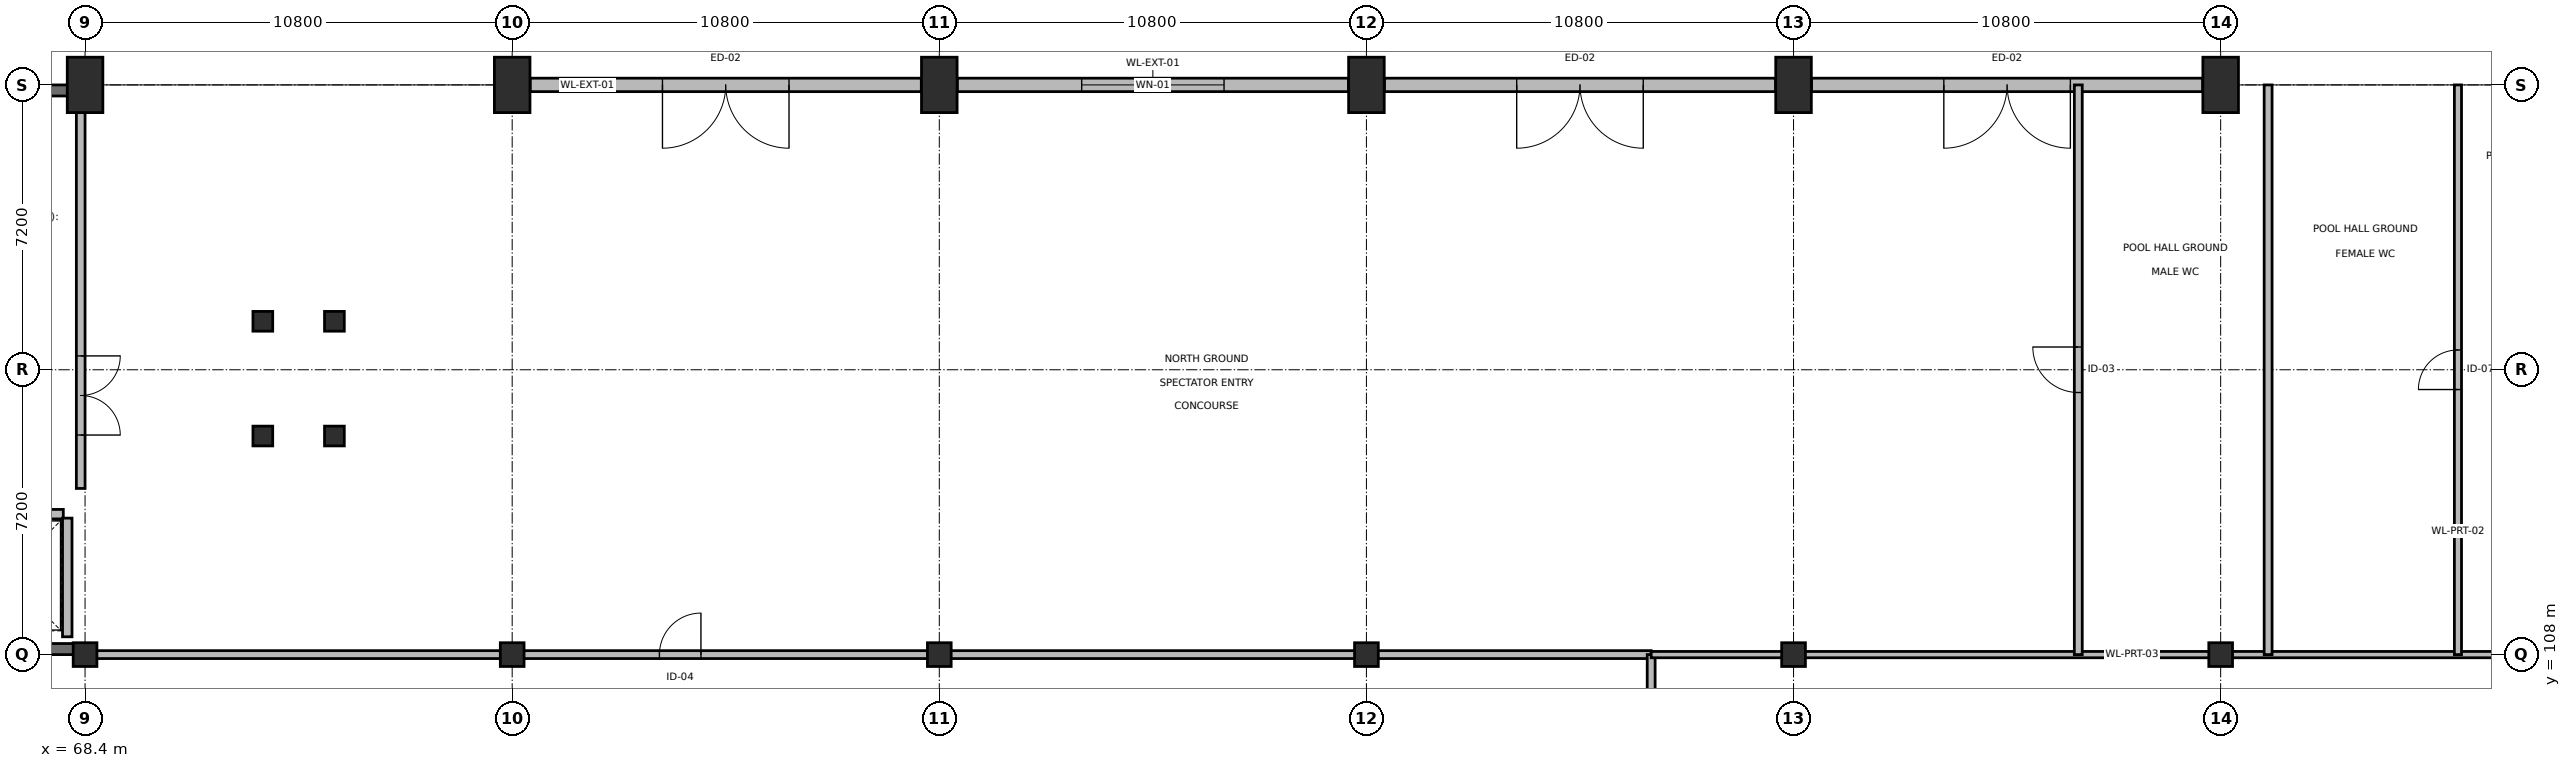
"""IFC4 building model, lengths in metres.
Left out: names, types, materials, properties, quantities, classifications, styles, units other than length and angle.
Written with IfcOpenShell. Run it as: python <this file> out.ifc"""

import sys

from ifc_helpers import new_model, si_unit, direction, frame, frame_2d, origin, origin_2d, place, context, subcontext, project, spatial, rectangle, extrude, element, fill, save


model = new_model("IFC4")
c1 = context("Model", 3, precision=1e-05, world=origin(), true_north=direction((0.0, 1.0)))
c2 = subcontext(c1, "Body", "Model", "MODEL_VIEW")
j1 = project(units=[si_unit("LENGTHUNIT", "METRE"), si_unit("PLANEANGLEUNIT", "RADIAN")], contexts=[c1])
p1 = place(None, origin())
s1 = spatial("IfcSite", under=j1, at=p1, CompositionType="ELEMENT")
p2 = place(p1, origin())
s2 = spatial("IfcBuilding", under=s1, at=p2, CompositionType="ELEMENT")
p3 = place(p2, origin())
s3 = spatial("IfcBuildingStorey", under=s2, at=p3, CompositionType="ELEMENT", Elevation=0.0)
for number, where, z_axis, x_axis in (
    (1, (68.4, 122.4, 0.0), (0.0, 0.0, 1.0), (1.0, 0.0, 0.0)),
    (2, (111.6, 122.4, 0.0), (0.0, 0.0, 1.0), (1.0, 0.0, 0.0)),
    (3, (79.2, 122.4, 0.0), (0.0, 0.0, 1.0), (1.0, 0.0, 0.0)),
    (4, (90.0, 122.4, 0.0), (0.0, 0.0, 1.0), (1.0, 0.0, 0.0)),
    (5, (100.8, 122.4, 0.0), (0.0, 0.0, 1.0), (1.0, 0.0, 0.0)),
    (6, (122.4, 122.4, 0.0), (0.0, 0.0, 1.0), (1.0, 0.0, 0.0)),
):
    element("IfcColumn", number, at=place(p3, frame(where, z_axis=z_axis, x_axis=x_axis)), inside=s3, PredefinedType="COLUMN", context=c2, shape_type="SweptSolid", body=[
        extrude(rectangle(XDim=0.9, YDim=1.4, at=origin_2d()), origin(), (0.0, 0.0, 1.0), 4.8),
    ])
for number, where, z_axis, x_axis in (
    (7, (68.4, 108.0, 0.0), (0.0, 0.0, 1.0), (1.0, 0.0, 0.0)),
    (8, (79.2, 108.0, 0.0), (0.0, 0.0, 1.0), (1.0, 0.0, 0.0)),
    (9, (90.0, 108.0, 0.0), (0.0, 0.0, 1.0), (1.0, 0.0, 0.0)),
    (10, (100.8, 108.0, 0.0), (0.0, 0.0, 1.0), (1.0, 0.0, 0.0)),
    (11, (111.6, 108.0, 0.0), (0.0, 0.0, 1.0), (1.0, 0.0, 0.0)),
    (12, (122.4, 108.0, 0.0), (0.0, 0.0, 1.0), (1.0, 0.0, 0.0)),
):
    element("IfcColumn", number, at=place(p3, frame(where, z_axis=z_axis, x_axis=x_axis)), inside=s3, PredefinedType="COLUMN", context=c2, shape_type="SweptSolid", body=[
        extrude(rectangle(XDim=0.6, YDim=0.6, at=origin_2d()), origin(), (0.0, 0.0, 1.0), 4.8),
    ])
for number, where, z_axis, x_axis in (
    (13, (72.895, 113.525, 0.0), (0.0, 0.0, 1.0), (1.0, 0.0, 0.0)),
    (14, (72.895, 116.425, 0.0), (0.0, 0.0, 1.0), (1.0, 0.0, 0.0)),
    (15, (74.705, 113.525, 0.0), (0.0, 0.0, 1.0), (1.0, 0.0, 0.0)),
    (16, (74.705, 116.425, 0.0), (0.0, 0.0, 1.0), (1.0, 0.0, 0.0)),
):
    element("IfcColumn", number, at=place(p3, frame(where, z_axis=z_axis, x_axis=x_axis)), inside=s3, PredefinedType="COLUMN", context=c2, shape_type="SweptSolid", body=[
        extrude(rectangle(XDim=0.5, YDim=0.5, at=origin_2d()), origin(), (0.0, 0.0, 1.0), 4.8),
    ])
p4 = place(p3, frame((57.6, 108.14, 0.0), z_axis=(0.0, 0.0, 1.0), x_axis=(1.0, 0.0, 0.0)))
e17 = element("IfcWall", 17, at=p4, inside=s3, PredefinedType="SHEAR", context=c2, shape_type="SweptSolid", body=[
    extrude(rectangle(XDim=10.8, YDim=0.28, at=frame_2d((5.4, 0.0))), origin(), (0.0, 0.0, 1.0), 4.8),
])
p5 = place(p3, frame((64.0, 122.26, 0.0), z_axis=(0.0, 0.0, 1.0), x_axis=(1.0, 0.0, 0.0)))
e18 = element("IfcWall", 18, at=p5, inside=s3, PredefinedType="SHEAR", context=c2, shape_type="SweptSolid", body=[
    extrude(rectangle(XDim=4.4, YDim=0.28, at=frame_2d((2.2, 0.0))), origin(), (0.0, 0.0, 1.0), 4.8),
])
p6 = place(p3, frame((79.655, 122.4, 0.0), z_axis=(0.0, 0.0, 1.0), x_axis=(1.0, 0.0, 0.0)))
e19 = element("IfcWall", 19, at=p6, inside=s3, PredefinedType="SOLIDWALL", context=c2, shape_type="SweptSolid", body=[
    extrude(rectangle(XDim=9.89, YDim=0.34, at=frame_2d((4.945, 0.0))), origin(), (0.0, 0.0, 1.0), 3.655),
])
p7 = place(p6, frame((3.345, 0.0, 0.0)))
e20 = element("IfcOpeningElement", 20, at=p7, cuts=e19, PredefinedType="OPENING", context=c2, shape_type="SweptSolid", body=[
    extrude(rectangle(XDim=3.2, YDim=2.6, at=frame_2d((1.6, 1.3))), frame((0.0, 0.18, 0.0), z_axis=(0.0, -1.0, 0.0), x_axis=(1.0, 0.0, 0.0)), (0.0, 0.0, 1.0), 0.36),
])
p8 = place(p3, frame((90.455, 122.4, 0.0), z_axis=(0.0, 0.0, 1.0), x_axis=(1.0, 0.0, 0.0)))
e21 = element("IfcWall", 21, at=p8, inside=s3, PredefinedType="SOLIDWALL", context=c2, shape_type="SweptSolid", body=[
    extrude(rectangle(XDim=9.89, YDim=0.34, at=frame_2d((4.945, 0.0))), origin(), (0.0, 0.0, 1.0), 3.655),
])
p9 = place(p8, frame((3.145, 0.0, 0.95)))
e22 = element("IfcOpeningElement", 22, at=p9, cuts=e21, PredefinedType="OPENING", context=c2, shape_type="SweptSolid", body=[
    extrude(rectangle(XDim=3.6, YDim=0.9, at=frame_2d((1.8, 0.45))), frame((0.0, 0.18, 0.0), z_axis=(0.0, -1.0, 0.0), x_axis=(1.0, 0.0, 0.0)), (0.0, 0.0, 1.0), 0.36),
])
p10 = place(p3, frame((101.255, 122.4, 0.0), z_axis=(0.0, 0.0, 1.0), x_axis=(1.0, 0.0, 0.0)))
e23 = element("IfcWall", 23, at=p10, inside=s3, PredefinedType="SOLIDWALL", context=c2, shape_type="SweptSolid", body=[
    extrude(rectangle(XDim=9.89, YDim=0.34, at=frame_2d((4.945, 0.0))), origin(), (0.0, 0.0, 1.0), 3.655),
])
p11 = place(p10, frame((3.345, 0.0, 0.0)))
e24 = element("IfcOpeningElement", 24, at=p11, cuts=e23, PredefinedType="OPENING", context=c2, shape_type="SweptSolid", body=[
    extrude(rectangle(XDim=3.2, YDim=2.6, at=frame_2d((1.6, 1.3))), frame((0.0, 0.18, 0.0), z_axis=(0.0, -1.0, 0.0), x_axis=(1.0, 0.0, 0.0)), (0.0, 0.0, 1.0), 0.36),
])
p12 = place(p3, frame((112.055, 122.4, 0.0), z_axis=(0.0, 0.0, 1.0), x_axis=(1.0, 0.0, 0.0)))
e25 = element("IfcWall", 25, at=p12, inside=s3, PredefinedType="SOLIDWALL", context=c2, shape_type="SweptSolid", body=[
    extrude(rectangle(XDim=9.89, YDim=0.34, at=frame_2d((4.945, 0.0))), origin(), (0.0, 0.0, 1.0), 3.655),
])
p13 = place(p12, frame((3.345, 0.0, 0.0)))
e26 = element("IfcOpeningElement", 26, at=p13, cuts=e25, PredefinedType="OPENING", context=c2, shape_type="SweptSolid", body=[
    extrude(rectangle(XDim=3.2, YDim=2.6, at=frame_2d((1.6, 1.3))), frame((0.0, 0.18, 0.0), z_axis=(0.0, -1.0, 0.0), x_axis=(1.0, 0.0, 0.0)), (0.0, 0.0, 1.0), 0.36),
])
p14 = place(p3, frame((64.95, 111.55, 0.0), z_axis=(0.0, 0.0, 1.0), x_axis=(1.0, 0.0, 0.0)))
e27 = element("IfcWall", 27, at=p14, inside=s3, PredefinedType="SOLIDWALL", context=c2, shape_type="SweptSolid", body=[
    extrude(rectangle(XDim=2.9, YDim=0.24, at=frame_2d((1.45, 0.0))), origin(), (0.0, 0.0, 1.0), 4.505),
])
p15 = place(p14, frame((0.9, 0.0, 0.0)))
e28 = element("IfcOpeningElement", 28, at=p15, cuts=e27, PredefinedType="OPENING", context=c2, shape_type="SweptSolid", body=[
    extrude(rectangle(XDim=1.1, YDim=2.15, at=frame_2d((0.55, 1.075))), frame((0.0, 0.13, 0.0), z_axis=(0.0, -1.0, 0.0), x_axis=(1.0, 0.0, 0.0)), (0.0, 0.0, 1.0), 0.26),
])
p16 = place(p3, frame((67.95, 108.45, 0.0), z_axis=(0.0, 0.0, 1.0), x_axis=(0.0, 1.0, 0.0)))
e29 = element("IfcWall", 29, at=p16, inside=s3, PredefinedType="SOLIDWALL", context=c2, shape_type="SweptSolid", body=[
    extrude(rectangle(XDim=3.0, YDim=0.24, at=frame_2d((1.5, 0.0))), origin(), (0.0, 0.0, 1.0), 4.505),
])
p17 = place(p3, frame((68.29, 112.2, 0.0), z_axis=(0.0, 0.0, 1.0), x_axis=(0.0, 1.0, 0.0)))
e30 = element("IfcWall", 30, at=p17, inside=s3, PredefinedType="PARTITIONING", context=c2, shape_type="SweptSolid", body=[
    extrude(rectangle(XDim=9.75, YDim=0.22, at=frame_2d((4.875, 0.0))), origin(), (0.0, 0.0, 1.0), 3.755),
])
p18 = place(p17, frame((1.35, 0.0, 0.0)))
e31 = element("IfcOpeningElement", 31, at=p18, cuts=e30, PredefinedType="OPENING", context=c2, shape_type="SweptSolid", body=[
    extrude(rectangle(XDim=2.0, YDim=2.2, at=frame_2d((1.0, 1.1))), frame((0.0, 0.12, 0.0), z_axis=(0.0, -1.0, 0.0), x_axis=(1.0, 0.0, 0.0)), (0.0, 0.0, 1.0), 0.24),
])
p19 = place(p3, frame((68.4, 108.0, 0.0), z_axis=(0.0, 0.0, 1.0), x_axis=(1.0, 0.0, 0.0)))
e32 = element("IfcWall", 32, at=p19, inside=s3, PredefinedType="PARTITIONING", context=c2, shape_type="SweptSolid", body=[
    extrude(rectangle(XDim=39.6, YDim=0.2, at=frame_2d((19.8, 0.0))), origin(), (0.0, 0.0, 1.0), 2.905),
])
p20 = place(p19, frame((14.523, 0.0, 0.0)))
e33 = element("IfcOpeningElement", 33, at=p20, cuts=e32, PredefinedType="OPENING", context=c2, shape_type="SweptSolid", body=[
    extrude(rectangle(XDim=1.05, YDim=2.15, at=frame_2d((0.525, 1.075))), frame((0.0, 0.11, 0.0), z_axis=(0.0, -1.0, 0.0), x_axis=(1.0, 0.0, 0.0)), (0.0, 0.0, 1.0), 0.22),
])
p21 = place(p3, frame((108.0, 86.4, 0.0), z_axis=(0.0, 0.0, 1.0), x_axis=(0.0, 1.0, 0.0)))
e34 = element("IfcWall", 34, at=p21, inside=s3, PredefinedType="PARTITIONING", context=c2, shape_type="SweptSolid", body=[
    extrude(rectangle(XDim=21.6, YDim=0.2, at=frame_2d((10.8, 0.0))), origin(), (0.0, 0.0, 1.0), 2.905),
])
p22 = place(p3, frame((108.0, 108.0, 0.0), z_axis=(0.0, 0.0, 1.0), x_axis=(1.0, 0.0, 0.0)))
e35 = element("IfcWall", 35, at=p22, inside=s3, PredefinedType="PARTITIONING", context=c2, shape_type="SweptSolid", body=[
    extrude(rectangle(XDim=25.2, YDim=0.16, at=frame_2d((12.6, 0.0))), origin(), (0.0, 0.0, 1.0), 2.905),
])
p23 = place(p3, frame((118.8, 108.0, 0.0), z_axis=(0.0, 0.0, 1.0), x_axis=(0.0, 1.0, 0.0)))
e36 = element("IfcWall", 36, at=p23, inside=s3, PredefinedType="PARTITIONING", context=c2, shape_type="SweptSolid", body=[
    extrude(rectangle(XDim=14.4, YDim=0.2, at=frame_2d((7.2, 0.0))), origin(), (0.0, 0.0, 1.0), 3.655),
])
p24 = place(p23, frame((6.625, 0.0, 0.0)))
e37 = element("IfcOpeningElement", 37, at=p24, cuts=e36, PredefinedType="OPENING", context=c2, shape_type="SweptSolid", body=[
    extrude(rectangle(XDim=1.15, YDim=2.2, at=frame_2d((0.575, 1.1))), frame((0.0, 0.11, 0.0), z_axis=(0.0, -1.0, 0.0), x_axis=(1.0, 0.0, 0.0)), (0.0, 0.0, 1.0), 0.22),
])
p25 = place(p3, frame((123.6, 108.0, 0.0), z_axis=(0.0, 0.0, 1.0), x_axis=(0.0, 1.0, 0.0)))
e38 = element("IfcWall", 38, at=p25, inside=s3, PredefinedType="PARTITIONING", context=c2, shape_type="SweptSolid", body=[
    extrude(rectangle(XDim=14.4, YDim=0.2, at=frame_2d((7.2, 0.0))), origin(), (0.0, 0.0, 1.0), 3.655),
])
p26 = place(p3, frame((128.4, 108.0, 0.0), z_axis=(0.0, 0.0, 1.0), x_axis=(0.0, 1.0, 0.0)))
e39 = element("IfcWall", 39, at=p26, inside=s3, PredefinedType="PARTITIONING", context=c2, shape_type="SweptSolid", body=[
    extrude(rectangle(XDim=14.4, YDim=0.18, at=frame_2d((7.2, 0.0))), origin(), (0.0, 0.0, 1.0), 3.655),
])
p27 = place(p26, frame((6.7, 0.0, 0.0)))
e40 = element("IfcOpeningElement", 40, at=p27, cuts=e39, PredefinedType="OPENING", context=c2, shape_type="SweptSolid", body=[
    extrude(rectangle(XDim=1.0, YDim=2.1, at=frame_2d((0.5, 1.05))), frame((0.0, 0.1, 0.0), z_axis=(0.0, -1.0, 0.0), x_axis=(1.0, 0.0, 0.0)), (0.0, 0.0, 1.0), 0.2),
])
p28 = place(p7, origin())
e41 = element("IfcDoor", 41, at=p28, inside=s3, OperationType="DOUBLE_DOOR_SINGLE_SWING", PredefinedType="DOOR", context=c2, shape_type="SweptSolid", body=[
    extrude(rectangle(XDim=3.2, YDim=2.6, at=frame_2d((1.6, 1.3))), frame((0.0, 0.025, 0.0), z_axis=(0.0, -1.0, 0.0), x_axis=(1.0, 0.0, 0.0)), (0.0, 0.0, 1.0), 0.05),
])
fill(e20, e41)
p29 = place(p9, origin())
e42 = element("IfcWindow", 42, at=p29, inside=s3, PartitioningType="SINGLE_PANEL", PredefinedType="WINDOW", context=c2, shape_type="SweptSolid", body=[
    extrude(rectangle(XDim=3.6, YDim=0.9, at=frame_2d((1.8, 0.45))), frame((0.0, 0.03, 0.0), z_axis=(0.0, -1.0, 0.0), x_axis=(1.0, 0.0, 0.0)), (0.0, 0.0, 1.0), 0.06),
])
fill(e22, e42)
p30 = place(p11, origin())
e43 = element("IfcDoor", 43, at=p30, inside=s3, OperationType="DOUBLE_DOOR_SINGLE_SWING", PredefinedType="DOOR", context=c2, shape_type="SweptSolid", body=[
    extrude(rectangle(XDim=3.2, YDim=2.6, at=frame_2d((1.6, 1.3))), frame((0.0, 0.025, 0.0), z_axis=(0.0, -1.0, 0.0), x_axis=(1.0, 0.0, 0.0)), (0.0, 0.0, 1.0), 0.05),
])
fill(e24, e43)
p31 = place(p13, origin())
e44 = element("IfcDoor", 44, at=p31, inside=s3, OperationType="DOUBLE_DOOR_SINGLE_SWING", PredefinedType="DOOR", context=c2, shape_type="SweptSolid", body=[
    extrude(rectangle(XDim=3.2, YDim=2.6, at=frame_2d((1.6, 1.3))), frame((0.0, 0.025, 0.0), z_axis=(0.0, -1.0, 0.0), x_axis=(1.0, 0.0, 0.0)), (0.0, 0.0, 1.0), 0.05),
])
fill(e26, e44)
p32 = place(p18, origin())
e45 = element("IfcDoor", 45, at=p32, inside=s3, OperationType="DOUBLE_DOOR_SINGLE_SWING", PredefinedType="DOOR", context=c2, shape_type="SweptSolid", body=[
    extrude(rectangle(XDim=2.0, YDim=2.2, at=frame_2d((1.0, 1.1))), frame((0.0, 0.025, 0.0), z_axis=(0.0, -1.0, 0.0), x_axis=(1.0, 0.0, 0.0)), (0.0, 0.0, 1.0), 0.05),
])
fill(e31, e45)
p33 = place(p20, origin())
e46 = element("IfcDoor", 46, at=p33, inside=s3, OperationType="SINGLE_SWING_RIGHT", PredefinedType="DOOR", context=c2, shape_type="SweptSolid", body=[
    extrude(rectangle(XDim=1.05, YDim=2.15, at=frame_2d((0.525, 1.075))), frame((0.0, 0.025, 0.0), z_axis=(0.0, -1.0, 0.0), x_axis=(1.0, 0.0, 0.0)), (0.0, 0.0, 1.0), 0.05),
])
fill(e33, e46)
p34 = place(p24, origin())
e47 = element("IfcDoor", 47, at=p34, inside=s3, OperationType="SINGLE_SWING_RIGHT", PredefinedType="DOOR", context=c2, shape_type="SweptSolid", body=[
    extrude(rectangle(XDim=1.15, YDim=2.2, at=frame_2d((0.575, 1.1))), frame((0.0, 0.025, 0.0), z_axis=(0.0, -1.0, 0.0), x_axis=(1.0, 0.0, 0.0)), (0.0, 0.0, 1.0), 0.05),
])
fill(e37, e47)
p35 = place(p27, origin())
e48 = element("IfcDoor", 48, at=p35, inside=s3, OperationType="SINGLE_SWING_LEFT", PredefinedType="DOOR", context=c2, shape_type="SweptSolid", body=[
    extrude(rectangle(XDim=1.0, YDim=2.1, at=frame_2d((0.5, 1.05))), frame((0.0, 0.025, 0.0), z_axis=(0.0, -1.0, 0.0), x_axis=(1.0, 0.0, 0.0)), (0.0, 0.0, 1.0), 0.05),
])
fill(e40, e48)
save(model, sys.argv[1])
